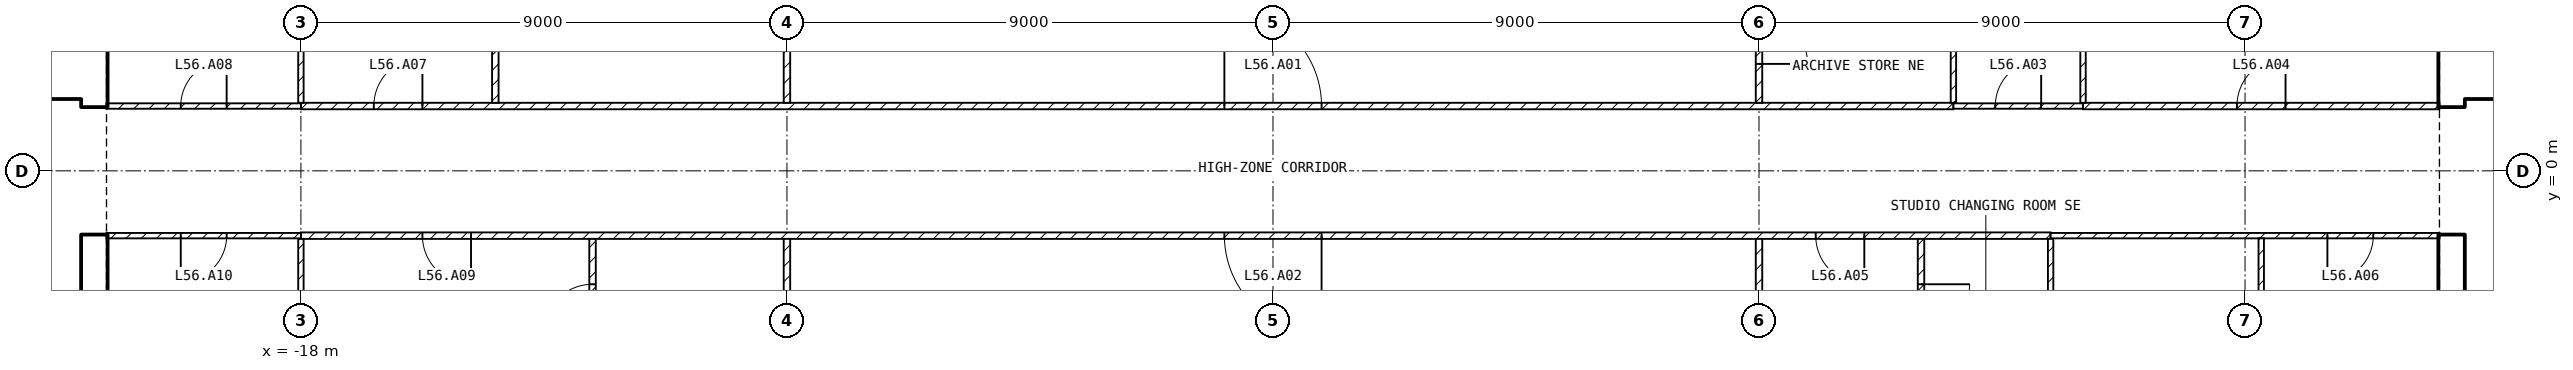
"""IFC4 building model, lengths in metres.
Left out: names, types, materials, properties, quantities, classifications, styles, units other than length and angle.
Written with IfcOpenShell. Run it as: python <this file> out.ifc"""

import sys

from ifc_helpers import new_model, si_unit, direction, frame, frame_2d, origin, place, context, subcontext, project, spatial, rectangle, extrude, element, fill, save


model = new_model("IFC4")
c1 = context("Model", 3, precision=1e-05, world=origin(), true_north=direction((0.0, 1.0)))
c2 = subcontext(c1, "Body", "Model", "MODEL_VIEW")
j1 = project(units=[si_unit("LENGTHUNIT", "METRE"), si_unit("PLANEANGLEUNIT", "RADIAN")], contexts=[c1])
p1 = place(None, origin())
s1 = spatial("IfcSite", under=j1, at=p1, CompositionType="ELEMENT")
p2 = place(p1, origin())
s2 = spatial("IfcBuilding", under=s1, at=p2, CompositionType="ELEMENT")
p3 = place(p2, frame((0.0, 0.0, 222.6)))
s3 = spatial("IfcBuildingStorey", under=s2, at=p3, CompositionType="ELEMENT", Elevation=222.6)
for number, where, z_axis, x_axis in (
    (1, (21.825, -8.1, 0.0), (0.0, 0.0, 1.0), (0.0, 1.0, 0.0)),
    (2, (21.825, 1.2, 0.0), (0.0, 0.0, 1.0), (0.0, 1.0, 0.0)),
):
    element("IfcWall", number, at=place(p3, frame(where, z_axis=z_axis, x_axis=x_axis)), inside=s3, PredefinedType="SHEAR", context=c2, shape_type="SweptSolid", body=[
        extrude(rectangle(XDim=6.9, YDim=0.45, at=frame_2d((3.45, 0.0))), origin(), (0.0, 0.0, 1.0), 4.95),
    ])
p4 = place(p3, frame((22.05, 1.45, 0.0), z_axis=(0.0, 0.0, 1.0), x_axis=(1.0, 0.0, 0.0)))
e3 = element("IfcWall", 3, at=p4, inside=s3, PredefinedType="SOLIDWALL", context=c2, shape_type="SweptSolid", body=[
    extrude(rectangle(XDim=11.15, YDim=0.2, at=frame_2d((5.575, 0.0))), origin(), (0.0, 0.0, 1.0), 4.95),
])
p5 = place(p4, frame((0.75, 0.0, 0.0)))
e4 = element("IfcOpeningElement", 4, at=p5, cuts=e3, PredefinedType="OPENING", context=c2, shape_type="SweptSolid", body=[
    extrude(rectangle(XDim=1.0, YDim=2.1, at=frame_2d((0.5, 1.05))), frame((0.0, 0.11, 0.0), z_axis=(0.0, -1.0, 0.0), x_axis=(1.0, 0.0, 0.0)), (0.0, 0.0, 1.0), 0.22),
])
p6 = place(p4, frame((3.25, 0.0, 0.0)))
e5 = element("IfcOpeningElement", 5, at=p6, cuts=e3, PredefinedType="OPENING", context=c2, shape_type="SweptSolid", body=[
    extrude(rectangle(XDim=1.0, YDim=2.1, at=frame_2d((0.5, 1.05))), frame((0.0, 0.11, 0.0), z_axis=(0.0, -1.0, 0.0), x_axis=(1.0, 0.0, 0.0)), (0.0, 0.0, 1.0), 0.22),
])
p7 = place(p4, frame((9.15, 0.0, 0.0)))
e6 = element("IfcOpeningElement", 6, at=p7, cuts=e3, PredefinedType="OPENING", context=c2, shape_type="SweptSolid", body=[
    extrude(rectangle(XDim=0.9, YDim=2.1, at=frame_2d((0.45, 1.05))), frame((0.0, 0.11, 0.0), z_axis=(0.0, -1.0, 0.0), x_axis=(1.0, 0.0, 0.0)), (0.0, 0.0, 1.0), 0.22),
])
for number, where, z_axis, x_axis in (
    (7, (-21.825, -8.1, 0.0), (0.0, 0.0, 1.0), (0.0, 1.0, 0.0)),
    (8, (-21.825, 1.2, 0.0), (0.0, 0.0, 1.0), (0.0, 1.0, 0.0)),
):
    element("IfcWall", number, at=place(p3, frame(where, z_axis=z_axis, x_axis=x_axis)), inside=s3, PredefinedType="SHEAR", context=c2, shape_type="SweptSolid", body=[
        extrude(rectangle(XDim=6.9, YDim=0.45, at=frame_2d((3.45, 0.0))), origin(), (0.0, 0.0, 1.0), 4.95),
    ])
p8 = place(p3, frame((-33.2, 1.45, 0.0), z_axis=(0.0, 0.0, 1.0), x_axis=(1.0, 0.0, 0.0)))
e9 = element("IfcWall", 9, at=p8, inside=s3, PredefinedType="SOLIDWALL", context=c2, shape_type="SweptSolid", body=[
    extrude(rectangle(XDim=11.15, YDim=0.2, at=frame_2d((5.575, 0.0))), origin(), (0.0, 0.0, 1.0), 4.95),
])
p9 = place(p8, frame((9.4, 0.0, 0.0)))
e10 = element("IfcOpeningElement", 10, at=p9, cuts=e9, PredefinedType="OPENING", context=c2, shape_type="SweptSolid", body=[
    extrude(rectangle(XDim=1.0, YDim=2.1, at=frame_2d((0.5, 1.05))), frame((0.0, 0.11, 0.0), z_axis=(0.0, -1.0, 0.0), x_axis=(1.0, 0.0, 0.0)), (0.0, 0.0, 1.0), 0.22),
])
p10 = place(p8, frame((6.9, 0.0, 0.0)))
e11 = element("IfcOpeningElement", 11, at=p10, cuts=e9, PredefinedType="OPENING", context=c2, shape_type="SweptSolid", body=[
    extrude(rectangle(XDim=1.0, YDim=2.1, at=frame_2d((0.5, 1.05))), frame((0.0, 0.11, 0.0), z_axis=(0.0, -1.0, 0.0), x_axis=(1.0, 0.0, 0.0)), (0.0, 0.0, 1.0), 0.22),
])
p11 = place(p8, frame((1.1, 0.0, 0.0)))
e12 = element("IfcOpeningElement", 12, at=p11, cuts=e9, PredefinedType="OPENING", context=c2, shape_type="SweptSolid", body=[
    extrude(rectangle(XDim=0.9, YDim=2.1, at=frame_2d((0.45, 1.05))), frame((0.0, 0.11, 0.0), z_axis=(0.0, -1.0, 0.0), x_axis=(1.0, 0.0, 0.0)), (0.0, 0.0, 1.0), 0.22),
])
p12 = place(p3, frame((-18.0, 1.2, 0.0), z_axis=(0.0, 0.0, 1.0), x_axis=(1.0, 0.0, 0.0)))
e13 = element("IfcWall", 13, at=p12, inside=s3, PredefinedType="PARTITIONING", context=c2, shape_type="SweptSolid", body=[
    extrude(rectangle(XDim=30.6, YDim=0.12, at=frame_2d((15.3, 0.0))), origin(), (0.0, 0.0, 1.0), 4.95),
])
p13 = place(p12, frame((17.1, 0.0, 0.0)))
e14 = element("IfcOpeningElement", 14, at=p13, cuts=e13, PredefinedType="OPENING", context=c2, shape_type="SweptSolid", body=[
    extrude(rectangle(XDim=1.8, YDim=2.1, at=frame_2d((0.9, 1.05))), frame((0.0, 0.07, 0.0), z_axis=(0.0, -1.0, 0.0), x_axis=(1.0, 0.0, 0.0)), (0.0, 0.0, 1.0), 0.14),
])
p14 = place(p12, frame((1.35, 0.0, 0.0)))
e15 = element("IfcOpeningElement", 15, at=p14, cuts=e13, PredefinedType="OPENING", context=c2, shape_type="SweptSolid", body=[
    extrude(rectangle(XDim=0.9, YDim=2.1, at=frame_2d((0.45, 1.05))), frame((0.0, 0.07, 0.0), z_axis=(0.0, -1.0, 0.0), x_axis=(1.0, 0.0, 0.0)), (0.0, 0.0, 1.0), 0.14),
])
p15 = place(p3, frame((14.4, -1.2, 0.0), z_axis=(0.0, 0.0, 1.0), x_axis=(-1.0, 0.0, 0.0)))
e16 = element("IfcWall", 16, at=p15, inside=s3, PredefinedType="PARTITIONING", context=c2, shape_type="SweptSolid", body=[
    extrude(rectangle(XDim=32.4, YDim=0.12, at=frame_2d((16.2, 0.0))), origin(), (0.0, 0.0, 1.0), 4.95),
])
p16 = place(p15, frame((13.5, 0.0, 0.0)))
e17 = element("IfcOpeningElement", 17, at=p16, cuts=e16, PredefinedType="OPENING", context=c2, shape_type="SweptSolid", body=[
    extrude(rectangle(XDim=1.8, YDim=2.1, at=frame_2d((0.9, 1.05))), frame((0.0, 0.07, 0.0), z_axis=(0.0, -1.0, 0.0), x_axis=(1.0, 0.0, 0.0)), (0.0, 0.0, 1.0), 0.14),
])
p17 = place(p15, frame((3.45, 0.0, 0.0)))
e18 = element("IfcOpeningElement", 18, at=p17, cuts=e16, PredefinedType="OPENING", context=c2, shape_type="SweptSolid", body=[
    extrude(rectangle(XDim=0.9, YDim=2.1, at=frame_2d((0.45, 1.05))), frame((0.0, 0.07, 0.0), z_axis=(0.0, -1.0, 0.0), x_axis=(1.0, 0.0, 0.0)), (0.0, 0.0, 1.0), 0.14),
])
p18 = place(p15, frame((29.25, 0.0, 0.0)))
e19 = element("IfcOpeningElement", 19, at=p18, cuts=e16, PredefinedType="OPENING", context=c2, shape_type="SweptSolid", body=[
    extrude(rectangle(XDim=0.9, YDim=2.1, at=frame_2d((0.45, 1.05))), frame((0.0, 0.07, 0.0), z_axis=(0.0, -1.0, 0.0), x_axis=(1.0, 0.0, 0.0)), (0.0, 0.0, 1.0), 0.14),
])
p19 = place(p3, frame((12.6, 1.2, 0.0), z_axis=(0.0, 0.0, 1.0), x_axis=(1.0, 0.0, 0.0)))
e20 = element("IfcWall", 20, at=p19, inside=s3, PredefinedType="PARTITIONING", context=c2, shape_type="SweptSolid", body=[
    extrude(rectangle(XDim=2.4, YDim=0.1, at=frame_2d((1.2, 0.0))), origin(), (0.0, 0.0, 1.0), 4.95),
])
p20 = place(p19, frame((0.775, 0.0, 0.0)))
e21 = element("IfcOpeningElement", 21, at=p20, cuts=e20, PredefinedType="OPENING", context=c2, shape_type="SweptSolid", body=[
    extrude(rectangle(XDim=0.85, YDim=2.1, at=frame_2d((0.425, 1.05))), frame((0.0, 0.06, 0.0), z_axis=(0.0, -1.0, 0.0), x_axis=(1.0, 0.0, 0.0)), (0.0, 0.0, 1.0), 0.12),
])
p21 = place(p3, frame((15.0, 1.2, 0.0), z_axis=(0.0, 0.0, 1.0), x_axis=(1.0, 0.0, 0.0)))
e22 = element("IfcWall", 22, at=p21, inside=s3, PredefinedType="PARTITIONING", context=c2, shape_type="SweptSolid", body=[
    extrude(rectangle(XDim=6.6, YDim=0.12, at=frame_2d((3.3, 0.0))), origin(), (0.0, 0.0, 1.0), 4.95),
])
p22 = place(p21, frame((2.85, 0.0, 0.0)))
e23 = element("IfcOpeningElement", 23, at=p22, cuts=e22, PredefinedType="OPENING", context=c2, shape_type="SweptSolid", body=[
    extrude(rectangle(XDim=0.9, YDim=2.1, at=frame_2d((0.45, 1.05))), frame((0.0, 0.07, 0.0), z_axis=(0.0, -1.0, 0.0), x_axis=(1.0, 0.0, 0.0)), (0.0, 0.0, 1.0), 0.14),
])
p23 = place(p3, frame((21.6, -1.2, 0.0), z_axis=(0.0, 0.0, 1.0), x_axis=(-1.0, 0.0, 0.0)))
e24 = element("IfcWall", 24, at=p23, inside=s3, PredefinedType="PARTITIONING", context=c2, shape_type="SweptSolid", body=[
    extrude(rectangle(XDim=7.2, YDim=0.1, at=frame_2d((3.6, 0.0))), origin(), (0.0, 0.0, 1.0), 4.95),
])
p24 = place(p23, frame((1.225, 0.0, 0.0)))
e25 = element("IfcOpeningElement", 25, at=p24, cuts=e24, PredefinedType="OPENING", context=c2, shape_type="SweptSolid", body=[
    extrude(rectangle(XDim=0.85, YDim=2.1, at=frame_2d((0.425, 1.05))), frame((0.0, 0.06, 0.0), z_axis=(0.0, -1.0, 0.0), x_axis=(1.0, 0.0, 0.0)), (0.0, 0.0, 1.0), 0.12),
])
p25 = place(p3, frame((-21.6, 1.2, 0.0), z_axis=(0.0, 0.0, 1.0), x_axis=(1.0, 0.0, 0.0)))
e26 = element("IfcWall", 26, at=p25, inside=s3, PredefinedType="PARTITIONING", context=c2, shape_type="SweptSolid", body=[
    extrude(rectangle(XDim=3.6, YDim=0.1, at=frame_2d((1.8, 0.0))), origin(), (0.0, 0.0, 1.0), 4.95),
])
p26 = place(p25, frame((1.375, 0.0, 0.0)))
e27 = element("IfcOpeningElement", 27, at=p26, cuts=e26, PredefinedType="OPENING", context=c2, shape_type="SweptSolid", body=[
    extrude(rectangle(XDim=0.85, YDim=2.1, at=frame_2d((0.425, 1.05))), frame((0.0, 0.06, 0.0), z_axis=(0.0, -1.0, 0.0), x_axis=(1.0, 0.0, 0.0)), (0.0, 0.0, 1.0), 0.12),
])
p27 = place(p3, frame((-18.0, -1.2, 0.0), z_axis=(0.0, 0.0, 1.0), x_axis=(-1.0, 0.0, 0.0)))
e28 = element("IfcWall", 28, at=p27, inside=s3, PredefinedType="PARTITIONING", context=c2, shape_type="SweptSolid", body=[
    extrude(rectangle(XDim=3.6, YDim=0.1, at=frame_2d((1.8, 0.0))), origin(), (0.0, 0.0, 1.0), 4.95),
])
p28 = place(p27, frame((1.375, 0.0, 0.0)))
e29 = element("IfcOpeningElement", 29, at=p28, cuts=e28, PredefinedType="OPENING", context=c2, shape_type="SweptSolid", body=[
    extrude(rectangle(XDim=0.85, YDim=2.1, at=frame_2d((0.425, 1.05))), frame((0.0, 0.06, 0.0), z_axis=(0.0, -1.0, 0.0), x_axis=(1.0, 0.0, 0.0)), (0.0, 0.0, 1.0), 0.12),
])
p29 = place(p3, frame((9.0, 8.92, 0.0), z_axis=(0.0, 0.0, 1.0), x_axis=(0.0, -1.0, 0.0)))
e30 = element("IfcWall", 30, at=p29, inside=s3, PredefinedType="PARTITIONING", context=c2, shape_type="SweptSolid", body=[
    extrude(rectangle(XDim=7.66, YDim=0.12, at=frame_2d((3.83, 0.0))), origin(), (0.0, 0.0, 1.0), 4.95),
])
p30 = place(p29, frame((6.04, 0.0, 0.0)))
e31 = element("IfcOpeningElement", 31, at=p30, cuts=e30, PredefinedType="OPENING", context=c2, shape_type="SweptSolid", body=[
    extrude(rectangle(XDim=0.9, YDim=2.1, at=frame_2d((0.45, 1.05))), frame((0.0, 0.07, 0.0), z_axis=(0.0, -1.0, 0.0), x_axis=(1.0, 0.0, 0.0)), (0.0, 0.0, 1.0), 0.14),
])
p31 = place(p29, frame((2.52, 0.0, 0.0)))
e32 = element("IfcOpeningElement", 32, at=p31, cuts=e30, PredefinedType="OPENING", context=c2, shape_type="SweptSolid", body=[
    extrude(rectangle(XDim=0.9, YDim=2.1, at=frame_2d((0.45, 1.05))), frame((0.0, 0.07, 0.0), z_axis=(0.0, -1.0, 0.0), x_axis=(1.0, 0.0, 0.0)), (0.0, 0.0, 1.0), 0.14),
])
p32 = place(p3, frame((-9.0, 1.26, 0.0), z_axis=(0.0, 0.0, 1.0), x_axis=(0.0, 1.0, 0.0)))
e33 = element("IfcWall", 33, at=p32, inside=s3, PredefinedType="PARTITIONING", context=c2, shape_type="SweptSolid", body=[
    extrude(rectangle(XDim=7.66, YDim=0.12, at=frame_2d((3.83, 0.0))), origin(), (0.0, 0.0, 1.0), 4.95),
])
p33 = place(p32, frame((4.24, 0.0, 0.0)))
e34 = element("IfcOpeningElement", 34, at=p33, cuts=e33, PredefinedType="OPENING", context=c2, shape_type="SweptSolid", body=[
    extrude(rectangle(XDim=0.9, YDim=2.1, at=frame_2d((0.45, 1.05))), frame((0.0, 0.07, 0.0), z_axis=(0.0, -1.0, 0.0), x_axis=(1.0, 0.0, 0.0)), (0.0, 0.0, 1.0), 0.14),
])
p34 = place(p32, frame((1.02, 0.0, 0.0)))
e35 = element("IfcOpeningElement", 35, at=p34, cuts=e33, PredefinedType="OPENING", context=c2, shape_type="SweptSolid", body=[
    extrude(rectangle(XDim=0.9, YDim=2.1, at=frame_2d((0.45, 1.05))), frame((0.0, 0.07, 0.0), z_axis=(0.0, -1.0, 0.0), x_axis=(1.0, 0.0, 0.0)), (0.0, 0.0, 1.0), 0.14),
])
p35 = place(p3, frame((9.0, -1.26, 0.0), z_axis=(0.0, 0.0, 1.0), x_axis=(0.0, -1.0, 0.0)))
e36 = element("IfcWall", 36, at=p35, inside=s3, PredefinedType="PARTITIONING", context=c2, shape_type="SweptSolid", body=[
    extrude(rectangle(XDim=7.66, YDim=0.12, at=frame_2d((3.83, 0.0))), origin(), (0.0, 0.0, 1.0), 4.95),
])
p36 = place(p35, frame((4.34, 0.0, 0.0)))
e37 = element("IfcOpeningElement", 37, at=p36, cuts=e36, PredefinedType="OPENING", context=c2, shape_type="SweptSolid", body=[
    extrude(rectangle(XDim=0.9, YDim=2.1, at=frame_2d((0.45, 1.05))), frame((0.0, 0.07, 0.0), z_axis=(0.0, -1.0, 0.0), x_axis=(1.0, 0.0, 0.0)), (0.0, 0.0, 1.0), 0.14),
])
p37 = place(p3, frame((-9.0, -8.92, 0.0), z_axis=(0.0, 0.0, 1.0), x_axis=(0.0, 1.0, 0.0)))
e38 = element("IfcWall", 38, at=p37, inside=s3, PredefinedType="PARTITIONING", context=c2, shape_type="SweptSolid", body=[
    extrude(rectangle(XDim=7.66, YDim=0.12, at=frame_2d((3.83, 0.0))), origin(), (0.0, 0.0, 1.0), 4.95),
])
for number, where, z_axis, x_axis in (
    (39, (12.6, 3.54, 0.0), (0.0, 0.0, 1.0), (0.0, -1.0, 0.0)),
    (40, (15.0, 3.54, 0.0), (0.0, 0.0, 1.0), (0.0, -1.0, 0.0)),
):
    element("IfcWall", number, at=place(p3, frame(where, z_axis=z_axis, x_axis=x_axis)), inside=s3, PredefinedType="PARTITIONING", context=c2, shape_type="SweptSolid", body=[
        extrude(rectangle(XDim=2.28, YDim=0.1, at=frame_2d((1.14, 0.0))), origin(), (0.0, 0.0, 1.0), 4.95),
    ])
p38 = place(p3, frame((12.0, -1.26, 0.0), z_axis=(0.0, 0.0, 1.0), x_axis=(0.0, -1.0, 0.0)))
e41 = element("IfcWall", 41, at=p38, inside=s3, PredefinedType="PARTITIONING", context=c2, shape_type="SweptSolid", body=[
    extrude(rectangle(XDim=2.58, YDim=0.12, at=frame_2d((1.29, 0.0))), origin(), (0.0, 0.0, 1.0), 4.95),
])
p39 = place(p38, frame((0.84, 0.0, 0.0)))
e42 = element("IfcOpeningElement", 42, at=p39, cuts=e41, PredefinedType="OPENING", context=c2, shape_type="SweptSolid", body=[
    extrude(rectangle(XDim=0.9, YDim=2.1, at=frame_2d((0.45, 1.05))), frame((0.0, 0.07, 0.0), z_axis=(0.0, -1.0, 0.0), x_axis=(1.0, 0.0, 0.0)), (0.0, 0.0, 1.0), 0.14),
])
p40 = place(p3, frame((14.4, -1.26, 0.0), z_axis=(0.0, 0.0, 1.0), x_axis=(0.0, -1.0, 0.0)))
e43 = element("IfcWall", 43, at=p40, inside=s3, PredefinedType="PARTITIONING", context=c2, shape_type="SweptSolid", body=[
    extrude(rectangle(XDim=2.58, YDim=0.1, at=frame_2d((1.29, 0.0))), origin(), (0.0, 0.0, 1.0), 4.95),
])
p41 = place(p3, frame((18.3, -1.25, 0.0), z_axis=(0.0, 0.0, 1.0), x_axis=(0.0, -1.0, 0.0)))
e44 = element("IfcWall", 44, at=p41, inside=s3, PredefinedType="PARTITIONING", context=c2, shape_type="SweptSolid", body=[
    extrude(rectangle(XDim=2.6, YDim=0.1, at=frame_2d((1.3, 0.0))), origin(), (0.0, 0.0, 1.0), 4.95),
])
p42 = place(p3, frame((-14.4, 1.26, 0.0), z_axis=(0.0, 0.0, 1.0), x_axis=(0.0, 1.0, 0.0)))
e45 = element("IfcWall", 45, at=p42, inside=s3, PredefinedType="PARTITIONING", context=c2, shape_type="SweptSolid", body=[
    extrude(rectangle(XDim=2.88, YDim=0.12, at=frame_2d((1.44, 0.0))), origin(), (0.0, 0.0, 1.0), 4.95),
])
p43 = place(p3, frame((-18.0, 1.26, 0.0), z_axis=(0.0, 0.0, 1.0), x_axis=(0.0, 1.0, 0.0)))
e46 = element("IfcWall", 46, at=p43, inside=s3, PredefinedType="PARTITIONING", context=c2, shape_type="SweptSolid", body=[
    extrude(rectangle(XDim=2.88, YDim=0.1, at=frame_2d((1.44, 0.0))), origin(), (0.0, 0.0, 1.0), 4.18),
])
p44 = place(p3, frame((-12.6, -3.84, 0.0), z_axis=(0.0, 0.0, 1.0), x_axis=(0.0, 1.0, 0.0)))
e47 = element("IfcWall", 47, at=p44, inside=s3, PredefinedType="PARTITIONING", context=c2, shape_type="SweptSolid", body=[
    extrude(rectangle(XDim=2.58, YDim=0.12, at=frame_2d((1.29, 0.0))), origin(), (0.0, 0.0, 1.0), 4.95),
])
p45 = place(p44, frame((0.84, 0.0, 0.0)))
e48 = element("IfcOpeningElement", 48, at=p45, cuts=e47, PredefinedType="OPENING", context=c2, shape_type="SweptSolid", body=[
    extrude(rectangle(XDim=0.9, YDim=2.1, at=frame_2d((0.45, 1.05))), frame((0.0, 0.07, 0.0), z_axis=(0.0, -1.0, 0.0), x_axis=(1.0, 0.0, 0.0)), (0.0, 0.0, 1.0), 0.14),
])
p46 = place(p3, frame((-18.0, -3.84, 0.0), z_axis=(0.0, 0.0, 1.0), x_axis=(0.0, 1.0, 0.0)))
e49 = element("IfcWall", 49, at=p46, inside=s3, PredefinedType="PARTITIONING", context=c2, shape_type="SweptSolid", body=[
    extrude(rectangle(XDim=2.58, YDim=0.1, at=frame_2d((1.29, 0.0))), origin(), (0.0, 0.0, 1.0), 4.18),
])
p47 = place(p13, origin())
e50 = element("IfcDoor", 50, at=p47, inside=s3, OperationType="SINGLE_SWING_LEFT", PredefinedType="DOOR", context=c2, shape_type="SweptSolid", body=[
    extrude(rectangle(XDim=1.8, YDim=2.1, at=frame_2d((0.9, 1.05))), frame((0.0, 0.025, 0.0), z_axis=(0.0, -1.0, 0.0), x_axis=(1.0, 0.0, 0.0)), (0.0, 0.0, 1.0), 0.05),
])
fill(e14, e50)
p48 = place(p16, origin())
e51 = element("IfcDoor", 51, at=p48, inside=s3, OperationType="SINGLE_SWING_LEFT", PredefinedType="DOOR", context=c2, shape_type="SweptSolid", body=[
    extrude(rectangle(XDim=1.8, YDim=2.1, at=frame_2d((0.9, 1.05))), frame((0.0, 0.025, 0.0), z_axis=(0.0, -1.0, 0.0), x_axis=(1.0, 0.0, 0.0)), (0.0, 0.0, 1.0), 0.05),
])
fill(e17, e51)
p49 = place(p20, origin())
e52 = element("IfcDoor", 52, at=p49, inside=s3, OperationType="SINGLE_SWING_RIGHT", PredefinedType="DOOR", context=c2, shape_type="SweptSolid", body=[
    extrude(rectangle(XDim=0.85, YDim=2.1, at=frame_2d((0.425, 1.05))), frame((0.0, 0.025, 0.0), z_axis=(0.0, -1.0, 0.0), x_axis=(1.0, 0.0, 0.0)), (0.0, 0.0, 1.0), 0.05),
])
fill(e21, e52)
p50 = place(p22, origin())
e53 = element("IfcDoor", 53, at=p50, inside=s3, OperationType="SINGLE_SWING_RIGHT", PredefinedType="DOOR", context=c2, shape_type="SweptSolid", body=[
    extrude(rectangle(XDim=0.9, YDim=2.1, at=frame_2d((0.45, 1.05))), frame((0.0, 0.025, 0.0), z_axis=(0.0, -1.0, 0.0), x_axis=(1.0, 0.0, 0.0)), (0.0, 0.0, 1.0), 0.05),
])
fill(e23, e53)
p51 = place(p17, origin())
e54 = element("IfcDoor", 54, at=p51, inside=s3, OperationType="SINGLE_SWING_LEFT", PredefinedType="DOOR", context=c2, shape_type="SweptSolid", body=[
    extrude(rectangle(XDim=0.9, YDim=2.1, at=frame_2d((0.45, 1.05))), frame((0.0, 0.025, 0.0), z_axis=(0.0, -1.0, 0.0), x_axis=(1.0, 0.0, 0.0)), (0.0, 0.0, 1.0), 0.05),
])
fill(e18, e54)
p52 = place(p24, origin())
e55 = element("IfcDoor", 55, at=p52, inside=s3, OperationType="SINGLE_SWING_RIGHT", PredefinedType="DOOR", context=c2, shape_type="SweptSolid", body=[
    extrude(rectangle(XDim=0.85, YDim=2.1, at=frame_2d((0.425, 1.05))), frame((0.0, 0.025, 0.0), z_axis=(0.0, -1.0, 0.0), x_axis=(1.0, 0.0, 0.0)), (0.0, 0.0, 1.0), 0.05),
])
fill(e25, e55)
p53 = place(p14, origin())
e56 = element("IfcDoor", 56, at=p53, inside=s3, OperationType="SINGLE_SWING_RIGHT", PredefinedType="DOOR", context=c2, shape_type="SweptSolid", body=[
    extrude(rectangle(XDim=0.9, YDim=2.1, at=frame_2d((0.45, 1.05))), frame((0.0, 0.025, 0.0), z_axis=(0.0, -1.0, 0.0), x_axis=(1.0, 0.0, 0.0)), (0.0, 0.0, 1.0), 0.05),
])
fill(e15, e56)
p54 = place(p26, origin())
e57 = element("IfcDoor", 57, at=p54, inside=s3, OperationType="SINGLE_SWING_RIGHT", PredefinedType="DOOR", context=c2, shape_type="SweptSolid", body=[
    extrude(rectangle(XDim=0.85, YDim=2.1, at=frame_2d((0.425, 1.05))), frame((0.0, 0.025, 0.0), z_axis=(0.0, -1.0, 0.0), x_axis=(1.0, 0.0, 0.0)), (0.0, 0.0, 1.0), 0.05),
])
fill(e27, e57)
p55 = place(p18, origin())
e58 = element("IfcDoor", 58, at=p55, inside=s3, OperationType="SINGLE_SWING_LEFT", PredefinedType="DOOR", context=c2, shape_type="SweptSolid", body=[
    extrude(rectangle(XDim=0.9, YDim=2.1, at=frame_2d((0.45, 1.05))), frame((0.0, 0.025, 0.0), z_axis=(0.0, -1.0, 0.0), x_axis=(1.0, 0.0, 0.0)), (0.0, 0.0, 1.0), 0.05),
])
fill(e19, e58)
p56 = place(p28, origin())
e59 = element("IfcDoor", 59, at=p56, inside=s3, OperationType="SINGLE_SWING_RIGHT", PredefinedType="DOOR", context=c2, shape_type="SweptSolid", body=[
    extrude(rectangle(XDim=0.85, YDim=2.1, at=frame_2d((0.425, 1.05))), frame((0.0, 0.025, 0.0), z_axis=(0.0, -1.0, 0.0), x_axis=(1.0, 0.0, 0.0)), (0.0, 0.0, 1.0), 0.05),
])
fill(e29, e59)
p57 = place(p30, origin())
e60 = element("IfcDoor", 60, at=p57, inside=s3, OperationType="SINGLE_SWING_RIGHT", PredefinedType="DOOR", context=c2, shape_type="SweptSolid", body=[
    extrude(rectangle(XDim=0.9, YDim=2.1, at=frame_2d((0.45, 1.05))), frame((0.0, 0.025, 0.0), z_axis=(0.0, -1.0, 0.0), x_axis=(1.0, 0.0, 0.0)), (0.0, 0.0, 1.0), 0.05),
])
fill(e31, e60)
p58 = place(p39, origin())
e61 = element("IfcDoor", 61, at=p58, inside=s3, OperationType="SINGLE_SWING_LEFT", PredefinedType="DOOR", context=c2, shape_type="SweptSolid", body=[
    extrude(rectangle(XDim=0.9, YDim=2.1, at=frame_2d((0.45, 1.05))), frame((0.0, 0.025, 0.0), z_axis=(0.0, -1.0, 0.0), x_axis=(1.0, 0.0, 0.0)), (0.0, 0.0, 1.0), 0.05),
])
fill(e42, e61)
p59 = place(p45, origin())
e62 = element("IfcDoor", 62, at=p59, inside=s3, OperationType="SINGLE_SWING_LEFT", PredefinedType="DOOR", context=c2, shape_type="SweptSolid", body=[
    extrude(rectangle(XDim=0.9, YDim=2.1, at=frame_2d((0.45, 1.05))), frame((0.0, 0.025, 0.0), z_axis=(0.0, -1.0, 0.0), x_axis=(1.0, 0.0, 0.0)), (0.0, 0.0, 1.0), 0.05),
])
fill(e48, e62)
save(model, sys.argv[1])
